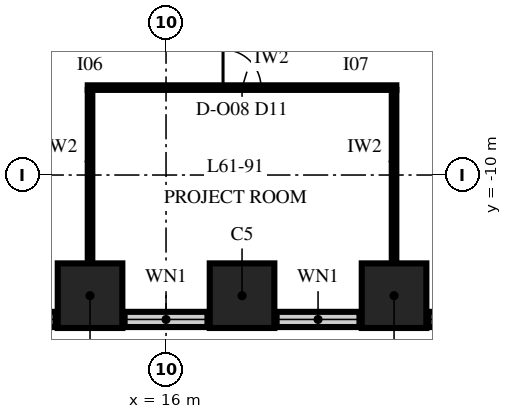
"""IFC4 building model, lengths in metres.
Left out: names, types, materials, properties, quantities, classifications, styles, units other than length and angle.
Written with IfcOpenShell. Run it as: python <this file> out.ifc"""

import sys

from ifc_helpers import new_model, si_unit, direction, frame, frame_2d, origin, origin_2d, place, context, subcontext, project, spatial, rectangle, extrude, element, fill, save


model = new_model("IFC4")
c1 = context("Model", 3, precision=1e-05, world=origin(), true_north=direction((0.0, 1.0)))
c2 = subcontext(c1, "Body", "Model", "MODEL_VIEW")
j1 = project(units=[si_unit("LENGTHUNIT", "METRE"), si_unit("PLANEANGLEUNIT", "RADIAN")], contexts=[c1])
p1 = place(None, origin())
s1 = spatial("IfcSite", under=j1, at=p1, CompositionType="ELEMENT")
p2 = place(p1, origin())
s2 = spatial("IfcBuilding", under=s1, at=p2, CompositionType="ELEMENT")
p3 = place(p2, frame((0.0, 0.0, 264.0)))
s3 = spatial("IfcBuildingStorey", under=s2, at=p3, CompositionType="ELEMENT", Elevation=264.0)
for number, where, z_axis, x_axis in (
    (1, (14.0, -13.175, 0.0), (0.0, 0.0, 1.0), (1.0, 0.0, 0.0)),
    (2, (18.0, -13.175, 0.0), (0.0, 0.0, 1.0), (1.0, 0.0, 0.0)),
    (3, (22.0, -13.175, 0.0), (0.0, 0.0, 1.0), (1.0, 0.0, 0.0)),
):
    element("IfcColumn", number, at=place(p3, frame(where, z_axis=z_axis, x_axis=x_axis)), inside=s3, PredefinedType="COLUMN", context=c2, shape_type="SweptSolid", body=[
        extrude(rectangle(XDim=1.7, YDim=1.7, at=origin_2d()), origin(), (0.0, 0.0, 1.0), 4.0),
    ])
p4 = place(p3, frame((-26.0, -13.8, 0.0), z_axis=(0.0, 0.0, 1.0), x_axis=(1.0, 0.0, 0.0)))
e4 = element("IfcWall", 4, at=p4, inside=s3, PredefinedType="SOLIDWALL", context=c2, shape_type="SweptSolid", body=[
    extrude(rectangle(XDim=52.0, YDim=0.4, at=frame_2d((26.0, 0.0))), origin(), (0.0, 0.0, 1.0), 2.0),
])
p5 = place(p4, frame((0.95, 0.0, 0.8)))
e5 = element("IfcOpeningElement", 5, at=p5, cuts=e4, PredefinedType="OPENING", context=c2, shape_type="SweptSolid", body=[
    extrude(rectangle(XDim=2.1, YDim=1.15, at=frame_2d((1.05, 0.575))), frame((0.0, 0.215, 0.0), z_axis=(0.0, -1.0, 0.0), x_axis=(1.0, 0.0, 0.0)), (0.0, 0.0, 1.0), 0.43),
])
p6 = place(p4, frame((4.95, 0.0, 0.8)))
e6 = element("IfcOpeningElement", 6, at=p6, cuts=e4, PredefinedType="OPENING", context=c2, shape_type="SweptSolid", body=[
    extrude(rectangle(XDim=2.1, YDim=1.15, at=frame_2d((1.05, 0.575))), frame((0.0, 0.215, 0.0), z_axis=(0.0, -1.0, 0.0), x_axis=(1.0, 0.0, 0.0)), (0.0, 0.0, 1.0), 0.43),
])
p7 = place(p4, frame((8.95, 0.0, 0.8)))
e7 = element("IfcOpeningElement", 7, at=p7, cuts=e4, PredefinedType="OPENING", context=c2, shape_type="SweptSolid", body=[
    extrude(rectangle(XDim=2.1, YDim=1.15, at=frame_2d((1.05, 0.575))), frame((0.0, 0.215, 0.0), z_axis=(0.0, -1.0, 0.0), x_axis=(1.0, 0.0, 0.0)), (0.0, 0.0, 1.0), 0.43),
])
p8 = place(p4, frame((12.95, 0.0, 0.8)))
e8 = element("IfcOpeningElement", 8, at=p8, cuts=e4, PredefinedType="OPENING", context=c2, shape_type="SweptSolid", body=[
    extrude(rectangle(XDim=2.1, YDim=1.15, at=frame_2d((1.05, 0.575))), frame((0.0, 0.215, 0.0), z_axis=(0.0, -1.0, 0.0), x_axis=(1.0, 0.0, 0.0)), (0.0, 0.0, 1.0), 0.43),
])
p9 = place(p4, frame((16.95, 0.0, 0.8)))
e9 = element("IfcOpeningElement", 9, at=p9, cuts=e4, PredefinedType="OPENING", context=c2, shape_type="SweptSolid", body=[
    extrude(rectangle(XDim=2.1, YDim=1.15, at=frame_2d((1.05, 0.575))), frame((0.0, 0.215, 0.0), z_axis=(0.0, -1.0, 0.0), x_axis=(1.0, 0.0, 0.0)), (0.0, 0.0, 1.0), 0.43),
])
p10 = place(p4, frame((20.95, 0.0, 0.8)))
e10 = element("IfcOpeningElement", 10, at=p10, cuts=e4, PredefinedType="OPENING", context=c2, shape_type="SweptSolid", body=[
    extrude(rectangle(XDim=2.1, YDim=1.15, at=frame_2d((1.05, 0.575))), frame((0.0, 0.215, 0.0), z_axis=(0.0, -1.0, 0.0), x_axis=(1.0, 0.0, 0.0)), (0.0, 0.0, 1.0), 0.43),
])
p11 = place(p4, frame((24.95, 0.0, 0.8)))
e11 = element("IfcOpeningElement", 11, at=p11, cuts=e4, PredefinedType="OPENING", context=c2, shape_type="SweptSolid", body=[
    extrude(rectangle(XDim=2.1, YDim=1.15, at=frame_2d((1.05, 0.575))), frame((0.0, 0.215, 0.0), z_axis=(0.0, -1.0, 0.0), x_axis=(1.0, 0.0, 0.0)), (0.0, 0.0, 1.0), 0.43),
])
p12 = place(p4, frame((28.95, 0.0, 0.8)))
e12 = element("IfcOpeningElement", 12, at=p12, cuts=e4, PredefinedType="OPENING", context=c2, shape_type="SweptSolid", body=[
    extrude(rectangle(XDim=2.1, YDim=1.15, at=frame_2d((1.05, 0.575))), frame((0.0, 0.215, 0.0), z_axis=(0.0, -1.0, 0.0), x_axis=(1.0, 0.0, 0.0)), (0.0, 0.0, 1.0), 0.43),
])
p13 = place(p4, frame((32.95, 0.0, 0.8)))
e13 = element("IfcOpeningElement", 13, at=p13, cuts=e4, PredefinedType="OPENING", context=c2, shape_type="SweptSolid", body=[
    extrude(rectangle(XDim=2.1, YDim=1.15, at=frame_2d((1.05, 0.575))), frame((0.0, 0.215, 0.0), z_axis=(0.0, -1.0, 0.0), x_axis=(1.0, 0.0, 0.0)), (0.0, 0.0, 1.0), 0.43),
])
p14 = place(p4, frame((36.95, 0.0, 0.8)))
e14 = element("IfcOpeningElement", 14, at=p14, cuts=e4, PredefinedType="OPENING", context=c2, shape_type="SweptSolid", body=[
    extrude(rectangle(XDim=2.1, YDim=1.15, at=frame_2d((1.05, 0.575))), frame((0.0, 0.215, 0.0), z_axis=(0.0, -1.0, 0.0), x_axis=(1.0, 0.0, 0.0)), (0.0, 0.0, 1.0), 0.43),
])
p15 = place(p4, frame((40.95, 0.0, 0.8)))
e15 = element("IfcOpeningElement", 15, at=p15, cuts=e4, PredefinedType="OPENING", context=c2, shape_type="SweptSolid", body=[
    extrude(rectangle(XDim=2.1, YDim=1.15, at=frame_2d((1.05, 0.575))), frame((0.0, 0.215, 0.0), z_axis=(0.0, -1.0, 0.0), x_axis=(1.0, 0.0, 0.0)), (0.0, 0.0, 1.0), 0.43),
])
p16 = place(p4, frame((44.95, 0.0, 0.8)))
e16 = element("IfcOpeningElement", 16, at=p16, cuts=e4, PredefinedType="OPENING", context=c2, shape_type="SweptSolid", body=[
    extrude(rectangle(XDim=2.1, YDim=1.15, at=frame_2d((1.05, 0.575))), frame((0.0, 0.215, 0.0), z_axis=(0.0, -1.0, 0.0), x_axis=(1.0, 0.0, 0.0)), (0.0, 0.0, 1.0), 0.43),
])
p17 = place(p4, frame((48.95, 0.0, 0.8)))
e17 = element("IfcOpeningElement", 17, at=p17, cuts=e4, PredefinedType="OPENING", context=c2, shape_type="SweptSolid", body=[
    extrude(rectangle(XDim=2.1, YDim=1.15, at=frame_2d((1.05, 0.575))), frame((0.0, 0.215, 0.0), z_axis=(0.0, -1.0, 0.0), x_axis=(1.0, 0.0, 0.0)), (0.0, 0.0, 1.0), 0.43),
])
p18 = place(p3, frame((13.94, -7.7, 0.0), z_axis=(0.0, 0.0, 1.0), x_axis=(1.0, 0.0, 0.0)))
e18 = element("IfcWall", 18, at=p18, inside=s3, PredefinedType="PARTITIONING", context=c2, shape_type="SweptSolid", body=[
    extrude(rectangle(XDim=8.12, YDim=0.12, at=frame_2d((4.06, 0.0))), origin(), (0.0, 0.0, 1.0), 3.23),
])
p19 = place(p18, frame((3.56, 0.0, 0.0)))
e19 = element("IfcOpeningElement", 19, at=p19, cuts=e18, PredefinedType="OPENING", context=c2, shape_type="SweptSolid", body=[
    extrude(rectangle(XDim=1.0, YDim=2.4, at=frame_2d((0.5, 1.2))), frame((0.0, 0.075, 0.0), z_axis=(0.0, -1.0, 0.0), x_axis=(1.0, 0.0, 0.0)), (0.0, 0.0, 1.0), 0.15),
])
for number, where, z_axis, x_axis in (
    (20, (14.0, -12.325, 0.0), (0.0, 0.0, 1.0), (0.0, 1.0, 0.0)),
    (21, (22.0, -12.325, 0.0), (0.0, 0.0, 1.0), (0.0, 1.0, 0.0)),
):
    element("IfcWall", number, at=place(p3, frame(where, z_axis=z_axis, x_axis=x_axis)), inside=s3, PredefinedType="PARTITIONING", context=c2, shape_type="SweptSolid", body=[
        extrude(rectangle(XDim=4.565, YDim=0.12, at=frame_2d((2.282, 0.0))), origin(), (0.0, 0.0, 1.0), 3.23),
    ])
p20 = place(p14, origin())
e22 = element("IfcWindow", 22, at=p20, inside=s3, PartitioningType="SINGLE_PANEL", PredefinedType="WINDOW", context=c2, shape_type="SweptSolid", body=[
    extrude(rectangle(XDim=2.1, YDim=1.15, at=frame_2d((1.05, 0.575))), frame((0.0, 0.03, 0.0), z_axis=(0.0, -1.0, 0.0), x_axis=(1.0, 0.0, 0.0)), (0.0, 0.0, 1.0), 0.06),
])
fill(e14, e22)
p21 = place(p15, origin())
e23 = element("IfcWindow", 23, at=p21, inside=s3, PartitioningType="SINGLE_PANEL", PredefinedType="WINDOW", context=c2, shape_type="SweptSolid", body=[
    extrude(rectangle(XDim=2.1, YDim=1.15, at=frame_2d((1.05, 0.575))), frame((0.0, 0.03, 0.0), z_axis=(0.0, -1.0, 0.0), x_axis=(1.0, 0.0, 0.0)), (0.0, 0.0, 1.0), 0.06),
])
fill(e15, e23)
p22 = place(p16, origin())
e24 = element("IfcWindow", 24, at=p22, inside=s3, PartitioningType="SINGLE_PANEL", PredefinedType="WINDOW", context=c2, shape_type="SweptSolid", body=[
    extrude(rectangle(XDim=2.1, YDim=1.15, at=frame_2d((1.05, 0.575))), frame((0.0, 0.03, 0.0), z_axis=(0.0, -1.0, 0.0), x_axis=(1.0, 0.0, 0.0)), (0.0, 0.0, 1.0), 0.06),
])
fill(e16, e24)
p23 = place(p17, origin())
e25 = element("IfcWindow", 25, at=p23, inside=s3, PartitioningType="SINGLE_PANEL", PredefinedType="WINDOW", context=c2, shape_type="SweptSolid", body=[
    extrude(rectangle(XDim=2.1, YDim=1.15, at=frame_2d((1.05, 0.575))), frame((0.0, 0.03, 0.0), z_axis=(0.0, -1.0, 0.0), x_axis=(1.0, 0.0, 0.0)), (0.0, 0.0, 1.0), 0.06),
])
fill(e17, e25)
p24 = place(p19, origin())
e26 = element("IfcDoor", 26, at=p24, inside=s3, OperationType="SINGLE_SWING_RIGHT", PredefinedType="DOOR", context=c2, shape_type="SweptSolid", body=[
    extrude(rectangle(XDim=1.0, YDim=2.4, at=frame_2d((0.5, 1.2))), frame((0.0, 0.06, 0.0), z_axis=(0.0, -1.0, 0.0), x_axis=(1.0, 0.0, 0.0)), (0.0, 0.0, 1.0), 0.12),
])
fill(e19, e26)
save(model, sys.argv[1])
